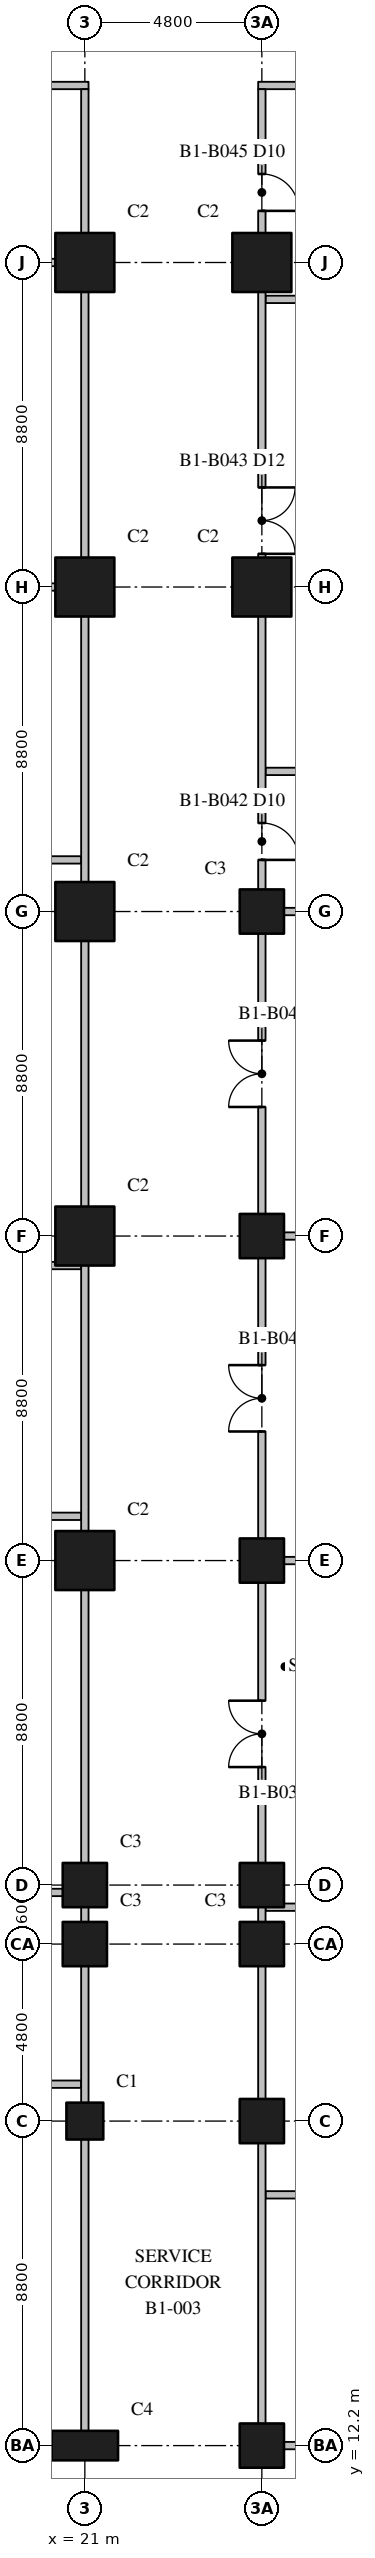
"""IFC4 building model, lengths in metres.
Left out: names, types, materials, properties, quantities, classifications, styles, units other than length and angle.
Written with IfcOpenShell. Run it as: python <this file> out.ifc"""

import sys

from ifc_helpers import new_model, si_unit, direction, frame, frame_2d, origin, origin_2d, place, context, subcontext, project, spatial, rectangle, extrude, element, fill, save


model = new_model("IFC4")
c1 = context("Model", 3, precision=1e-05, world=origin(), true_north=direction((0.0, 1.0)))
c2 = subcontext(c1, "Body", "Model", "MODEL_VIEW")
j1 = project(units=[si_unit("LENGTHUNIT", "METRE"), si_unit("PLANEANGLEUNIT", "RADIAN")], contexts=[c1])
p1 = place(None, origin())
s1 = spatial("IfcSite", under=j1, at=p1, CompositionType="ELEMENT")
p2 = place(p1, origin())
s2 = spatial("IfcBuilding", under=s1, at=p2, CompositionType="ELEMENT")
p3 = place(p2, frame((0.0, 0.0, -7.0)))
s3 = spatial("IfcBuildingStorey", under=s2, at=p3, CompositionType="ELEMENT", Elevation=-7.0)
p4 = place(p3, frame((21.0, 12.2, 0.0), z_axis=(0.0, 0.0, 1.0), x_axis=(1.0, 0.0, 0.0)))
e1 = element("IfcColumn", 1, at=p4, inside=s3, PredefinedType="COLUMN", context=c2, shape_type="SweptSolid", body=[
    extrude(rectangle(XDim=1.8, YDim=0.8, at=origin_2d()), origin(), (0.0, 0.0, 1.0), 7.0),
])
p5 = place(p3, frame((21.0, 21.0, 0.0), z_axis=(0.0, 0.0, 1.0), x_axis=(1.0, 0.0, 0.0)))
e2 = element("IfcColumn", 2, at=p5, inside=s3, PredefinedType="COLUMN", context=c2, shape_type="SweptSolid", body=[
    extrude(rectangle(XDim=1.0, YDim=1.0, at=origin_2d()), origin(), (0.0, 0.0, 1.0), 7.0),
])
for number, where, z_axis, x_axis in (
    (3, (21.0, 25.8, 0.0), (0.0, 0.0, 1.0), (1.0, 0.0, 0.0)),
    (4, (21.0, 27.4, 0.0), (0.0, 0.0, 1.0), (1.0, 0.0, 0.0)),
):
    element("IfcColumn", number, at=place(p3, frame(where, z_axis=z_axis, x_axis=x_axis)), inside=s3, PredefinedType="COLUMN", context=c2, shape_type="SweptSolid", body=[
        extrude(rectangle(XDim=1.2, YDim=1.2, at=origin_2d()), origin(), (0.0, 0.0, 1.0), 7.0),
    ])
for number, where, z_axis, x_axis in (
    (5, (21.0, 36.2, 0.0), (0.0, 0.0, 1.0), (1.0, 0.0, 0.0)),
    (6, (21.0, 45.0, 0.0), (0.0, 0.0, 1.0), (1.0, 0.0, 0.0)),
    (7, (21.0, 53.8, 0.0), (0.0, 0.0, 1.0), (1.0, 0.0, 0.0)),
    (8, (21.0, 62.6, 0.0), (0.0, 0.0, 1.0), (1.0, 0.0, 0.0)),
    (9, (21.0, 71.4, 0.0), (0.0, 0.0, 1.0), (1.0, 0.0, 0.0)),
):
    element("IfcColumn", number, at=place(p3, frame(where, z_axis=z_axis, x_axis=x_axis)), inside=s3, PredefinedType="COLUMN", context=c2, shape_type="SweptSolid", body=[
        extrude(rectangle(XDim=1.6, YDim=1.6, at=origin_2d()), origin(), (0.0, 0.0, 1.0), 7.0),
    ])
for number, where, z_axis, x_axis in (
    (10, (25.8, 12.2, 0.0), (0.0, 0.0, 1.0), (1.0, 0.0, 0.0)),
    (11, (25.8, 21.0, 0.0), (0.0, 0.0, 1.0), (1.0, 0.0, 0.0)),
    (12, (25.8, 25.8, 0.0), (0.0, 0.0, 1.0), (1.0, 0.0, 0.0)),
    (13, (25.8, 27.4, 0.0), (0.0, 0.0, 1.0), (1.0, 0.0, 0.0)),
    (14, (25.8, 36.2, 0.0), (0.0, 0.0, 1.0), (1.0, 0.0, 0.0)),
    (15, (25.8, 45.0, 0.0), (0.0, 0.0, 1.0), (1.0, 0.0, 0.0)),
    (16, (25.8, 53.8, 0.0), (0.0, 0.0, 1.0), (1.0, 0.0, 0.0)),
):
    element("IfcColumn", number, at=place(p3, frame(where, z_axis=z_axis, x_axis=x_axis)), inside=s3, PredefinedType="COLUMN", context=c2, shape_type="SweptSolid", body=[
        extrude(rectangle(XDim=1.2, YDim=1.2, at=origin_2d()), origin(), (0.0, 0.0, 1.0), 7.0),
    ])
for number, where, z_axis, x_axis in (
    (17, (25.8, 62.6, 0.0), (0.0, 0.0, 1.0), (1.0, 0.0, 0.0)),
    (18, (25.8, 71.4, 0.0), (0.0, 0.0, 1.0), (1.0, 0.0, 0.0)),
):
    element("IfcColumn", number, at=place(p3, frame(where, z_axis=z_axis, x_axis=x_axis)), inside=s3, PredefinedType="COLUMN", context=c2, shape_type="SweptSolid", body=[
        extrude(rectangle(XDim=1.6, YDim=1.6, at=origin_2d()), origin(), (0.0, 0.0, 1.0), 7.0),
    ])
p6 = place(p3, frame((12.1, 12.2, 0.0), z_axis=(0.0, 0.0, 1.0), x_axis=(1.0, 0.0, 0.0)))
e19 = element("IfcWall", 19, at=p6, inside=s3, PredefinedType="PARTITIONING", context=c2, shape_type="SweptSolid", body=[
    extrude(rectangle(XDim=9.0, YDim=0.2, at=frame_2d((4.5, 0.0))), origin(), (0.0, 0.0, 1.0), 6.5),
])
p7 = place(p3, frame((25.7, 12.2, 0.0), z_axis=(0.0, 0.0, 1.0), x_axis=(1.0, 0.0, 0.0)))
e20 = element("IfcWall", 20, at=p7, inside=s3, PredefinedType="PARTITIONING", context=c2, shape_type="SweptSolid", body=[
    extrude(rectangle(XDim=32.1, YDim=0.2, at=frame_2d((16.05, 0.0))), origin(), (0.0, 0.0, 1.0), 6.5),
])
p8 = place(p7, frame((16.5, 0.0, 0.0)))
e21 = element("IfcOpeningElement", 21, at=p8, cuts=e20, PredefinedType="OPENING", context=c2, shape_type="SweptSolid", body=[
    extrude(rectangle(XDim=1.8, YDim=2.1, at=frame_2d((0.9, 1.05))), frame((0.0, 0.11, 0.0), z_axis=(0.0, -1.0, 0.0), x_axis=(1.0, 0.0, 0.0)), (0.0, 0.0, 1.0), 0.22),
])
p9 = place(p7, frame((25.3, 0.0, 0.0)))
e22 = element("IfcOpeningElement", 22, at=p9, cuts=e20, PredefinedType="OPENING", context=c2, shape_type="SweptSolid", body=[
    extrude(rectangle(XDim=1.8, YDim=2.1, at=frame_2d((0.9, 1.05))), frame((0.0, 0.11, 0.0), z_axis=(0.0, -1.0, 0.0), x_axis=(1.0, 0.0, 0.0)), (0.0, 0.0, 1.0), 0.22),
])
p10 = place(p7, frame((12.8, 0.0, 0.0)))
e23 = element("IfcOpeningElement", 23, at=p10, cuts=e20, PredefinedType="OPENING", context=c2, shape_type="SweptSolid", body=[
    extrude(rectangle(XDim=1.8, YDim=2.1, at=frame_2d((0.9, 1.05))), frame((0.0, 0.11, 0.0), z_axis=(0.0, -1.0, 0.0), x_axis=(1.0, 0.0, 0.0)), (0.0, 0.0, 1.0), 0.22),
])
p11 = place(p3, frame((12.1, 76.2, 0.0), z_axis=(0.0, 0.0, 1.0), x_axis=(1.0, 0.0, 0.0)))
e24 = element("IfcWall", 24, at=p11, inside=s3, PredefinedType="PARTITIONING", context=c2, shape_type="SweptSolid", body=[
    extrude(rectangle(XDim=9.0, YDim=0.2, at=frame_2d((4.5, 0.0))), origin(), (0.0, 0.0, 1.0), 6.5),
])
p12 = place(p3, frame((25.7, 76.2, 0.0), z_axis=(0.0, 0.0, 1.0), x_axis=(1.0, 0.0, 0.0)))
e25 = element("IfcWall", 25, at=p12, inside=s3, PredefinedType="PARTITIONING", context=c2, shape_type="SweptSolid", body=[
    extrude(rectangle(XDim=15.4, YDim=0.2, at=frame_2d((7.7, 0.0))), origin(), (0.0, 0.0, 1.0), 6.5),
])
p13 = place(p12, frame((12.7, 0.0, 0.0)))
e26 = element("IfcOpeningElement", 26, at=p13, cuts=e25, PredefinedType="OPENING", context=c2, shape_type="SweptSolid", body=[
    extrude(rectangle(XDim=1.0, YDim=2.1, at=frame_2d((0.5, 1.05))), frame((0.0, 0.11, 0.0), z_axis=(0.0, -1.0, 0.0), x_axis=(1.0, 0.0, 0.0)), (0.0, 0.0, 1.0), 0.22),
])
for number, where, z_axis, x_axis in (
    (27, (12.3, 22.0, 0.0), (0.0, 0.0, 1.0), (1.0, 0.0, 0.0)),
    (28, (12.3, 27.2, 0.0), (0.0, 0.0, 1.0), (1.0, 0.0, 0.0)),
    (29, (12.3, 37.4, 0.0), (0.0, 0.0, 1.0), (1.0, 0.0, 0.0)),
    (30, (12.3, 44.2, 0.0), (0.0, 0.0, 1.0), (1.0, 0.0, 0.0)),
    (31, (12.3, 55.2, 0.0), (0.0, 0.0, 1.0), (1.0, 0.0, 0.0)),
    (32, (12.3, 62.6, 0.0), (0.0, 0.0, 1.0), (1.0, 0.0, 0.0)),
    (33, (12.3, 71.4, 0.0), (0.0, 0.0, 1.0), (1.0, 0.0, 0.0)),
):
    element("IfcWall", number, at=place(p3, frame(where, z_axis=z_axis, x_axis=x_axis)), inside=s3, PredefinedType="PARTITIONING", context=c2, shape_type="SweptSolid", body=[
        extrude(rectangle(XDim=8.6, YDim=0.2, at=frame_2d((4.3, 0.0))), origin(), (0.0, 0.0, 1.0), 6.5),
    ])
p14 = place(p3, frame((25.9, 45.0, 0.0), z_axis=(0.0, 0.0, 1.0), x_axis=(1.0, 0.0, 0.0)))
e34 = element("IfcWall", 34, at=p14, inside=s3, PredefinedType="PARTITIONING", context=c2, shape_type="SweptSolid", body=[
    extrude(rectangle(XDim=55.3, YDim=0.2, at=frame_2d((27.65, 0.0))), origin(), (0.0, 0.0, 1.0), 6.5),
])
p15 = place(p14, frame((23.4, 0.0, 0.0)))
e35 = element("IfcOpeningElement", 35, at=p15, cuts=e34, PredefinedType="OPENING", context=c2, shape_type="SweptSolid", body=[
    extrude(rectangle(XDim=1.8, YDim=2.4, at=frame_2d((0.9, 1.2))), frame((0.0, 0.11, 0.0), z_axis=(0.0, -1.0, 0.0), x_axis=(1.0, 0.0, 0.0)), (0.0, 0.0, 1.0), 0.22),
])
p16 = place(p14, frame((31.4, 0.0, 0.0)))
e36 = element("IfcOpeningElement", 36, at=p16, cuts=e34, PredefinedType="OPENING", context=c2, shape_type="SweptSolid", body=[
    extrude(rectangle(XDim=1.8, YDim=2.4, at=frame_2d((0.9, 1.2))), frame((0.0, 0.11, 0.0), z_axis=(0.0, -1.0, 0.0), x_axis=(1.0, 0.0, 0.0)), (0.0, 0.0, 1.0), 0.22),
])
p17 = place(p14, frame((40.2, 0.0, 0.0)))
e37 = element("IfcOpeningElement", 37, at=p17, cuts=e34, PredefinedType="OPENING", context=c2, shape_type="SweptSolid", body=[
    extrude(rectangle(XDim=1.8, YDim=2.4, at=frame_2d((0.9, 1.2))), frame((0.0, 0.11, 0.0), z_axis=(0.0, -1.0, 0.0), x_axis=(1.0, 0.0, 0.0)), (0.0, 0.0, 1.0), 0.22),
])
p18 = place(p14, frame((46.9, 0.0, 0.0)))
e38 = element("IfcOpeningElement", 38, at=p18, cuts=e34, PredefinedType="OPENING", context=c2, shape_type="SweptSolid", body=[
    extrude(rectangle(XDim=1.8, YDim=2.4, at=frame_2d((0.9, 1.2))), frame((0.0, 0.11, 0.0), z_axis=(0.0, -1.0, 0.0), x_axis=(1.0, 0.0, 0.0)), (0.0, 0.0, 1.0), 0.22),
])
p19 = place(p3, frame((25.9, 26.8, 0.0), z_axis=(0.0, 0.0, 1.0), x_axis=(1.0, 0.0, 0.0)))
e39 = element("IfcWall", 39, at=p19, inside=s3, PredefinedType="PARTITIONING", context=c2, shape_type="SweptSolid", body=[
    extrude(rectangle(XDim=20.8, YDim=0.2, at=frame_2d((10.4, 0.0))), origin(), (0.0, 0.0, 1.0), 6.5),
])
p20 = place(p3, frame((25.9, 19.0, 0.0), z_axis=(0.0, 0.0, 1.0), x_axis=(1.0, 0.0, 0.0)))
e40 = element("IfcWall", 40, at=p20, inside=s3, PredefinedType="PARTITIONING", context=c2, shape_type="SweptSolid", body=[
    extrude(rectangle(XDim=7.0, YDim=0.2, at=frame_2d((3.5, 0.0))), origin(), (0.0, 0.0, 1.0), 6.5),
])
for number, where, z_axis, x_axis in (
    (41, (25.9, 36.2, 0.0), (0.0, 0.0, 1.0), (1.0, 0.0, 0.0)),
    (42, (25.9, 53.8, 0.0), (0.0, 0.0, 1.0), (1.0, 0.0, 0.0)),
):
    element("IfcWall", number, at=place(p3, frame(where, z_axis=z_axis, x_axis=x_axis)), inside=s3, PredefinedType="PARTITIONING", context=c2, shape_type="SweptSolid", body=[
        extrude(rectangle(XDim=20.6, YDim=0.2, at=frame_2d((10.3, 0.0))), origin(), (0.0, 0.0, 1.0), 6.5),
    ])
p21 = place(p3, frame((25.9, 57.6, 0.0), z_axis=(0.0, 0.0, 1.0), x_axis=(1.0, 0.0, 0.0)))
e43 = element("IfcWall", 43, at=p21, inside=s3, PredefinedType="PARTITIONING", context=c2, shape_type="SweptSolid", body=[
    extrude(rectangle(XDim=11.0, YDim=0.2, at=frame_2d((5.5, 0.0))), origin(), (0.0, 0.0, 1.0), 6.5),
])
p22 = place(p21, frame((4.5, 0.0, 0.0)))
e44 = element("IfcOpeningElement", 44, at=p22, cuts=e43, PredefinedType="OPENING", context=c2, shape_type="SweptSolid", body=[
    extrude(rectangle(XDim=1.8, YDim=2.1, at=frame_2d((0.9, 1.05))), frame((0.0, 0.11, 0.0), z_axis=(0.0, -1.0, 0.0), x_axis=(1.0, 0.0, 0.0)), (0.0, 0.0, 1.0), 0.22),
])
p23 = place(p3, frame((25.9, 70.4, 0.0), z_axis=(0.0, 0.0, 1.0), x_axis=(1.0, 0.0, 0.0)))
e45 = element("IfcWall", 45, at=p23, inside=s3, PredefinedType="PARTITIONING", context=c2, shape_type="SweptSolid", body=[
    extrude(rectangle(XDim=10.8, YDim=0.2, at=frame_2d((5.4, 0.0))), origin(), (0.0, 0.0, 1.0), 6.5),
])
p24 = place(p23, frame((4.5, 0.0, 0.0)))
e46 = element("IfcOpeningElement", 46, at=p24, cuts=e45, PredefinedType="OPENING", context=c2, shape_type="SweptSolid", body=[
    extrude(rectangle(XDim=1.8, YDim=2.1, at=frame_2d((0.9, 1.05))), frame((0.0, 0.11, 0.0), z_axis=(0.0, -1.0, 0.0), x_axis=(1.0, 0.0, 0.0)), (0.0, 0.0, 1.0), 0.22),
])
p25 = place(p3, frame((21.0, 12.3, 0.0), z_axis=(0.0, 0.0, 1.0), x_axis=(0.0, 1.0, 0.0)))
e47 = element("IfcWall", 47, at=p25, inside=s3, PredefinedType="PARTITIONING", context=c2, shape_type="SweptSolid", body=[
    extrude(rectangle(XDim=63.8, YDim=0.2, at=frame_2d((31.9, 0.0))), origin(), (0.0, 0.0, 1.0), 6.5),
])
p26 = place(p3, frame((25.8, 12.3, 0.0), z_axis=(0.0, 0.0, 1.0), x_axis=(0.0, 1.0, 0.0)))
e48 = element("IfcWall", 48, at=p26, inside=s3, PredefinedType="PARTITIONING", context=c2, shape_type="SweptSolid", body=[
    extrude(rectangle(XDim=63.8, YDim=0.2, at=frame_2d((31.9, 0.0))), origin(), (0.0, 0.0, 1.0), 6.5),
])
p27 = place(p26, frame((18.3, 0.0, 0.0)))
e49 = element("IfcOpeningElement", 49, at=p27, cuts=e48, PredefinedType="OPENING", context=c2, shape_type="SweptSolid", body=[
    extrude(rectangle(XDim=1.8, YDim=2.1, at=frame_2d((0.9, 1.05))), frame((0.0, 0.11, 0.0), z_axis=(0.0, -1.0, 0.0), x_axis=(1.0, 0.0, 0.0)), (0.0, 0.0, 1.0), 0.22),
])
p28 = place(p26, frame((27.4, 0.0, 0.0)))
e50 = element("IfcOpeningElement", 50, at=p28, cuts=e48, PredefinedType="OPENING", context=c2, shape_type="SweptSolid", body=[
    extrude(rectangle(XDim=1.8, YDim=2.1, at=frame_2d((0.9, 1.05))), frame((0.0, 0.11, 0.0), z_axis=(0.0, -1.0, 0.0), x_axis=(1.0, 0.0, 0.0)), (0.0, 0.0, 1.0), 0.22),
])
p29 = place(p26, frame((36.2, 0.0, 0.0)))
e51 = element("IfcOpeningElement", 51, at=p29, cuts=e48, PredefinedType="OPENING", context=c2, shape_type="SweptSolid", body=[
    extrude(rectangle(XDim=1.8, YDim=2.1, at=frame_2d((0.9, 1.05))), frame((0.0, 0.11, 0.0), z_axis=(0.0, -1.0, 0.0), x_axis=(1.0, 0.0, 0.0)), (0.0, 0.0, 1.0), 0.22),
])
p30 = place(p26, frame((42.9, 0.0, 0.0)))
e52 = element("IfcOpeningElement", 52, at=p30, cuts=e48, PredefinedType="OPENING", context=c2, shape_type="SweptSolid", body=[
    extrude(rectangle(XDim=1.0, YDim=2.1, at=frame_2d((0.5, 1.05))), frame((0.0, 0.11, 0.0), z_axis=(0.0, -1.0, 0.0), x_axis=(1.0, 0.0, 0.0)), (0.0, 0.0, 1.0), 0.22),
])
p31 = place(p26, frame((51.2, 0.0, 0.0)))
e53 = element("IfcOpeningElement", 53, at=p31, cuts=e48, PredefinedType="OPENING", context=c2, shape_type="SweptSolid", body=[
    extrude(rectangle(XDim=1.8, YDim=2.1, at=frame_2d((0.9, 1.05))), frame((0.0, 0.11, 0.0), z_axis=(0.0, -1.0, 0.0), x_axis=(1.0, 0.0, 0.0)), (0.0, 0.0, 1.0), 0.22),
])
p32 = place(p26, frame((60.5, 0.0, 0.0)))
e54 = element("IfcOpeningElement", 54, at=p32, cuts=e48, PredefinedType="OPENING", context=c2, shape_type="SweptSolid", body=[
    extrude(rectangle(XDim=1.0, YDim=2.1, at=frame_2d((0.5, 1.05))), frame((0.0, 0.11, 0.0), z_axis=(0.0, -1.0, 0.0), x_axis=(1.0, 0.0, 0.0)), (0.0, 0.0, 1.0), 0.22),
])
p33 = place(p27, origin())
e55 = element("IfcDoor", 55, at=p33, inside=s3, OperationType="DOUBLE_DOOR_SINGLE_SWING", PredefinedType="DOOR", context=c2, shape_type="SweptSolid", body=[
    extrude(rectangle(XDim=1.8, YDim=2.1, at=frame_2d((0.9, 1.05))), frame((0.0, 0.025, 0.0), z_axis=(0.0, -1.0, 0.0), x_axis=(1.0, 0.0, 0.0)), (0.0, 0.0, 1.0), 0.05),
])
fill(e49, e55)
p34 = place(p28, origin())
e56 = element("IfcDoor", 56, at=p34, inside=s3, OperationType="DOUBLE_DOOR_SINGLE_SWING", PredefinedType="DOOR", context=c2, shape_type="SweptSolid", body=[
    extrude(rectangle(XDim=1.8, YDim=2.1, at=frame_2d((0.9, 1.05))), frame((0.0, 0.025, 0.0), z_axis=(0.0, -1.0, 0.0), x_axis=(1.0, 0.0, 0.0)), (0.0, 0.0, 1.0), 0.05),
])
fill(e50, e56)
p35 = place(p29, origin())
e57 = element("IfcDoor", 57, at=p35, inside=s3, OperationType="DOUBLE_DOOR_SINGLE_SWING", PredefinedType="DOOR", context=c2, shape_type="SweptSolid", body=[
    extrude(rectangle(XDim=1.8, YDim=2.1, at=frame_2d((0.9, 1.05))), frame((0.0, 0.025, 0.0), z_axis=(0.0, -1.0, 0.0), x_axis=(1.0, 0.0, 0.0)), (0.0, 0.0, 1.0), 0.05),
])
fill(e51, e57)
p36 = place(p30, frame((1.0, 0.0, 0.0), z_axis=(0.0, 0.0, 1.0), x_axis=(-1.0, 0.0, 0.0)))
e58 = element("IfcDoor", 58, at=p36, inside=s3, OperationType="SINGLE_SWING_LEFT", PredefinedType="DOOR", context=c2, shape_type="SweptSolid", body=[
    extrude(rectangle(XDim=1.0, YDim=2.1, at=frame_2d((0.5, 1.05))), frame((0.0, 0.025, 0.0), z_axis=(0.0, -1.0, 0.0), x_axis=(1.0, 0.0, 0.0)), (0.0, 0.0, 1.0), 0.05),
])
fill(e52, e58)
p37 = place(p31, frame((1.8, 0.0, 0.0), z_axis=(0.0, 0.0, 1.0), x_axis=(-1.0, 0.0, 0.0)))
e59 = element("IfcDoor", 59, at=p37, inside=s3, OperationType="DOUBLE_DOOR_SINGLE_SWING", PredefinedType="DOOR", context=c2, shape_type="SweptSolid", body=[
    extrude(rectangle(XDim=1.8, YDim=2.1, at=frame_2d((0.9, 1.05))), frame((0.0, 0.025, 0.0), z_axis=(0.0, -1.0, 0.0), x_axis=(1.0, 0.0, 0.0)), (0.0, 0.0, 1.0), 0.05),
])
fill(e53, e59)
p38 = place(p32, frame((1.0, 0.0, 0.0), z_axis=(0.0, 0.0, 1.0), x_axis=(-1.0, 0.0, 0.0)))
e60 = element("IfcDoor", 60, at=p38, inside=s3, OperationType="SINGLE_SWING_LEFT", PredefinedType="DOOR", context=c2, shape_type="SweptSolid", body=[
    extrude(rectangle(XDim=1.0, YDim=2.1, at=frame_2d((0.5, 1.05))), frame((0.0, 0.025, 0.0), z_axis=(0.0, -1.0, 0.0), x_axis=(1.0, 0.0, 0.0)), (0.0, 0.0, 1.0), 0.05),
])
fill(e54, e60)
save(model, sys.argv[1])
